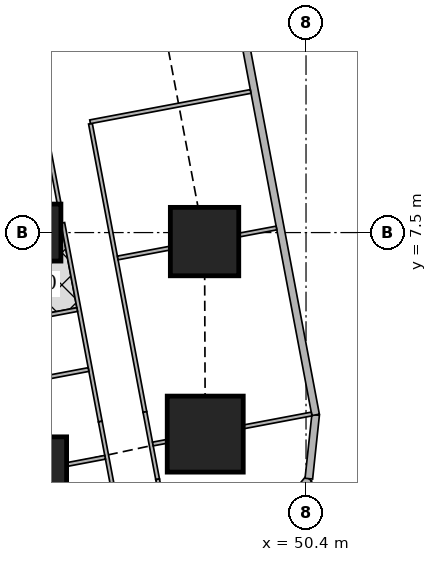
"""IFC4 building model, lengths in metres.
Left out: names, types, materials, properties, quantities, classifications, styles, units other than length and angle.
Written with IfcOpenShell. Run it as: python <this file> out.ifc"""

import sys

from ifc_helpers import new_model, si_unit, direction, frame, frame_2d, origin, origin_2d, place, context, subcontext, project, spatial, rectangle, extrude, element, fill, save


model = new_model("IFC4")
c1 = context("Model", 3, precision=1e-05, world=origin(), true_north=direction((0.0, 1.0)))
c2 = subcontext(c1, "Body", "Model", "MODEL_VIEW")
j1 = project(units=[si_unit("LENGTHUNIT", "METRE"), si_unit("PLANEANGLEUNIT", "RADIAN")], contexts=[c1])
p1 = place(None, origin())
s1 = spatial("IfcSite", under=j1, at=p1, CompositionType="ELEMENT")
p2 = place(p1, origin())
s2 = spatial("IfcBuilding", under=s1, at=p2, CompositionType="ELEMENT")
p3 = place(p2, frame((0.0, 0.0, 169.55)))
s3 = spatial("IfcBuildingStorey", under=s2, at=p3, CompositionType="ELEMENT", Elevation=169.55)
p4 = place(p3, frame((43.2, 1.225, 0.0), z_axis=(0.0, 0.0, 1.0), x_axis=(1.0, 0.0, 0.0)))
e1 = element("IfcColumn", 1, at=p4, inside=s3, PredefinedType="COLUMN", context=c2, shape_type="SweptSolid", body=[
    extrude(rectangle(XDim=1.8, YDim=1.8, at=origin_2d()), origin(), (0.0, 0.0, 1.0), 3.75),
])
p5 = place(p3, frame((47.748, 2.197, 0.0), z_axis=(0.0, 0.0, 1.0), x_axis=(1.0, 0.0, 0.0)))
e2 = element("IfcColumn", 2, at=p5, inside=s3, PredefinedType="COLUMN", context=c2, shape_type="SweptSolid", body=[
    extrude(rectangle(XDim=2.0, YDim=2.0, at=origin_2d()), origin(), (0.0, 0.0, 1.0), 3.75),
])
p6 = place(p3, frame((43.2, 7.5, 0.0), z_axis=(0.0, 0.0, 1.0), x_axis=(1.0, 0.0, 0.0)))
e3 = element("IfcColumn", 3, at=p6, inside=s3, PredefinedType="COLUMN", context=c2, shape_type="SweptSolid", body=[
    extrude(rectangle(XDim=1.5, YDim=1.5, at=origin_2d()), origin(), (0.0, 0.0, 1.0), 3.75),
])
p7 = place(p3, frame((47.73, 7.263, 0.0), z_axis=(0.0, 0.0, 1.0), x_axis=(1.0, 0.0, 0.0)))
e4 = element("IfcColumn", 4, at=p7, inside=s3, PredefinedType="COLUMN", context=c2, shape_type="SweptSolid", body=[
    extrude(rectangle(XDim=1.8, YDim=1.8, at=origin_2d()), origin(), (0.0, 0.0, 1.0), 3.75),
])
p8 = place(p3, frame((49.407, -0.263, 0.0), z_axis=(0.0, 0.0, 1.0), x_axis=(0.638042593423, 0.770001070764, 0.0)))
e5 = element("IfcWall", 5, at=p8, inside=s3, PredefinedType="SOLIDWALL", context=c2, shape_type="SweptSolid", body=[
    extrude(rectangle(XDim=1.673, YDim=0.2, at=frame_2d((0.836, 0.0))), origin(), (0.0, 0.0, 1.0), 3.5),
])
p9 = place(p3, frame((50.474, 1.025, 0.0), z_axis=(0.0, 0.0, 1.0), x_axis=(0.106047815515, 0.994361031429, 0.0)))
e6 = element("IfcWall", 6, at=p9, inside=s3, PredefinedType="SOLIDWALL", context=c2, shape_type="SweptSolid", body=[
    extrude(rectangle(XDim=1.688, YDim=0.2, at=frame_2d((0.844, 0.0))), origin(), (0.0, 0.0, 1.0), 3.5),
])
p10 = place(p3, frame((50.653, 2.703, 0.0), z_axis=(0.0, 0.0, 1.0), x_axis=(-0.185612026696, 0.982623109613, 0.0)))
e7 = element("IfcWall", 7, at=p10, inside=s3, PredefinedType="SOLIDWALL", context=c2, shape_type="SweptSolid", body=[
    extrude(rectangle(XDim=41.393, YDim=0.2, at=frame_2d((20.697, 0.0))), origin(), (0.0, 0.0, 1.0), 3.5),
])
p11 = place(p10, frame((1.633, 0.0, 0.9)))
e8 = element("IfcOpeningElement", 8, at=p11, cuts=e7, PredefinedType="OPENING", context=c2, shape_type="SweptSolid", body=[
    extrude(rectangle(XDim=1.8, YDim=1.5, at=frame_2d((0.9, 0.75))), frame((0.0, 0.11, 0.0), z_axis=(0.0, -1.0, 0.0), x_axis=(1.0, 0.0, 0.0)), (0.0, 0.0, 1.0), 0.22),
])
p12 = place(p10, frame((6.032, 0.0, 0.9)))
e9 = element("IfcOpeningElement", 9, at=p12, cuts=e7, PredefinedType="OPENING", context=c2, shape_type="SweptSolid", body=[
    extrude(rectangle(XDim=1.8, YDim=1.5, at=frame_2d((0.9, 0.75))), frame((0.0, 0.11, 0.0), z_axis=(0.0, -1.0, 0.0), x_axis=(1.0, 0.0, 0.0)), (0.0, 0.0, 1.0), 0.22),
])
p13 = place(p10, frame((9.848, 0.0, 0.9)))
e10 = element("IfcOpeningElement", 10, at=p13, cuts=e7, PredefinedType="OPENING", context=c2, shape_type="SweptSolid", body=[
    extrude(rectangle(XDim=1.8, YDim=1.5, at=frame_2d((0.9, 0.75))), frame((0.0, 0.11, 0.0), z_axis=(0.0, -1.0, 0.0), x_axis=(1.0, 0.0, 0.0)), (0.0, 0.0, 1.0), 0.22),
])
p14 = place(p10, frame((13.664, 0.0, 0.9)))
e11 = element("IfcOpeningElement", 11, at=p14, cuts=e7, PredefinedType="OPENING", context=c2, shape_type="SweptSolid", body=[
    extrude(rectangle(XDim=1.8, YDim=1.5, at=frame_2d((0.9, 0.75))), frame((0.0, 0.11, 0.0), z_axis=(0.0, -1.0, 0.0), x_axis=(1.0, 0.0, 0.0)), (0.0, 0.0, 1.0), 0.22),
])
p15 = place(p10, frame((17.481, 0.0, 0.9)))
e12 = element("IfcOpeningElement", 12, at=p15, cuts=e7, PredefinedType="OPENING", context=c2, shape_type="SweptSolid", body=[
    extrude(rectangle(XDim=1.8, YDim=1.5, at=frame_2d((0.9, 0.75))), frame((0.0, 0.11, 0.0), z_axis=(0.0, -1.0, 0.0), x_axis=(1.0, 0.0, 0.0)), (0.0, 0.0, 1.0), 0.22),
])
p16 = place(p10, frame((21.297, 0.0, 0.9)))
e13 = element("IfcOpeningElement", 13, at=p16, cuts=e7, PredefinedType="OPENING", context=c2, shape_type="SweptSolid", body=[
    extrude(rectangle(XDim=1.8, YDim=1.5, at=frame_2d((0.9, 0.75))), frame((0.0, 0.11, 0.0), z_axis=(0.0, -1.0, 0.0), x_axis=(1.0, 0.0, 0.0)), (0.0, 0.0, 1.0), 0.22),
])
p17 = place(p10, frame((25.113, 0.0, 0.9)))
e14 = element("IfcOpeningElement", 14, at=p17, cuts=e7, PredefinedType="OPENING", context=c2, shape_type="SweptSolid", body=[
    extrude(rectangle(XDim=1.8, YDim=1.5, at=frame_2d((0.9, 0.75))), frame((0.0, 0.11, 0.0), z_axis=(0.0, -1.0, 0.0), x_axis=(1.0, 0.0, 0.0)), (0.0, 0.0, 1.0), 0.22),
])
p18 = place(p10, frame((28.93, 0.0, 0.9)))
e15 = element("IfcOpeningElement", 15, at=p18, cuts=e7, PredefinedType="OPENING", context=c2, shape_type="SweptSolid", body=[
    extrude(rectangle(XDim=1.8, YDim=1.5, at=frame_2d((0.9, 0.75))), frame((0.0, 0.11, 0.0), z_axis=(0.0, -1.0, 0.0), x_axis=(1.0, 0.0, 0.0)), (0.0, 0.0, 1.0), 0.22),
])
p19 = place(p10, frame((32.746, 0.0, 0.9)))
e16 = element("IfcOpeningElement", 16, at=p19, cuts=e7, PredefinedType="OPENING", context=c2, shape_type="SweptSolid", body=[
    extrude(rectangle(XDim=1.8, YDim=1.5, at=frame_2d((0.9, 0.75))), frame((0.0, 0.11, 0.0), z_axis=(0.0, -1.0, 0.0), x_axis=(1.0, 0.0, 0.0)), (0.0, 0.0, 1.0), 0.22),
])
p20 = place(p10, frame((36.481, 0.0, 0.9)))
e17 = element("IfcOpeningElement", 17, at=p20, cuts=e7, PredefinedType="OPENING", context=c2, shape_type="SweptSolid", body=[
    extrude(rectangle(XDim=1.8, YDim=1.5, at=frame_2d((0.9, 0.75))), frame((0.0, 0.11, 0.0), z_axis=(0.0, -1.0, 0.0), x_axis=(1.0, 0.0, 0.0)), (0.0, 0.0, 1.0), 0.22),
])
p21 = place(p3, frame((44.727, 10.366, 0.0), z_axis=(0.0, 0.0, 1.0), x_axis=(0.185578957652, -0.982629355595, 0.0)))
e18 = element("IfcWall", 18, at=p21, inside=s3, PredefinedType="PARTITIONING", context=c2, shape_type="SweptSolid", body=[
    extrude(rectangle(XDim=7.721, YDim=0.1, at=frame_2d((3.86, 0.0))), origin(), (0.0, 0.0, 1.0), 3.5),
])
p22 = place(p21, frame((0.151, 0.0, 0.0)))
e19 = element("IfcOpeningElement", 19, at=p22, cuts=e18, PredefinedType="OPENING", context=c2, shape_type="SweptSolid", body=[
    extrude(rectangle(XDim=0.9, YDim=2.1, at=frame_2d((0.45, 1.05))), frame((0.0, 0.06, 0.0), z_axis=(0.0, -1.0, 0.0), x_axis=(1.0, 0.0, 0.0)), (0.0, 0.0, 1.0), 0.12),
])
p23 = place(p21, frame((3.806, 0.0, 0.0)))
e20 = element("IfcOpeningElement", 20, at=p23, cuts=e18, PredefinedType="OPENING", context=c2, shape_type="SweptSolid", body=[
    extrude(rectangle(XDim=0.9, YDim=2.1, at=frame_2d((0.45, 1.05))), frame((0.0, 0.06, 0.0), z_axis=(0.0, -1.0, 0.0), x_axis=(1.0, 0.0, 0.0)), (0.0, 0.0, 1.0), 0.12),
])
p24 = place(p3, frame((46.16, 2.779, 0.0), z_axis=(0.0, 0.0, 1.0), x_axis=(0.18597295662, -0.982554863306, 0.0)))
e21 = element("IfcWall", 21, at=p24, inside=s3, PredefinedType="PARTITIONING", context=c2, shape_type="SweptSolid", body=[
    extrude(rectangle(XDim=1.802, YDim=0.1, at=frame_2d((0.901, 0.0))), origin(), (0.0, 0.0, 1.0), 2.1),
])
p25 = place(p3, frame((46.495, 1.008, 0.0), z_axis=(0.0, 0.0, 1.0), x_axis=(0.185535059532, -0.982637645159, 0.0)))
e22 = element("IfcWall", 22, at=p25, inside=s3, PredefinedType="PARTITIONING", context=c2, shape_type="SweptSolid", body=[
    extrude(rectangle(XDim=1.644, YDim=0.1, at=frame_2d((0.822, 0.0))), origin(), (0.0, 0.0, 1.0), 3.5),
])
p26 = place(p3, frame((43.539, 10.192, 0.0), z_axis=(0.0, 0.0, 1.0), x_axis=(0.18564540894, -0.982616803306, 0.0)))
e23 = element("IfcWall", 23, at=p26, inside=s3, PredefinedType="PARTITIONING", context=c2, shape_type="SweptSolid", body=[
    extrude(rectangle(XDim=1.966, YDim=0.1, at=frame_2d((0.983, 0.0))), origin(), (0.0, 0.0, 1.0), 3.5),
])
p27 = place(p3, frame((43.999, 7.755, 0.0), z_axis=(0.0, 0.0, 1.0), x_axis=(0.185565904578, -0.982631820703, 0.0)))
e24 = element("IfcWall", 24, at=p27, inside=s3, PredefinedType="PARTITIONING", context=c2, shape_type="SweptSolid", body=[
    extrude(rectangle(XDim=5.319, YDim=0.1, at=frame_2d((2.66, 0.0))), origin(), (0.0, 0.0, 1.0), 3.5),
])
p28 = place(p27, frame((1.0, 0.0, 0.0)))
e25 = element("IfcOpeningElement", 25, at=p28, cuts=e24, PredefinedType="OPENING", context=c2, shape_type="SweptSolid", body=[
    extrude(rectangle(XDim=0.9, YDim=2.1, at=frame_2d((0.45, 1.05))), frame((0.0, 0.06, 0.0), z_axis=(0.0, -1.0, 0.0), x_axis=(1.0, 0.0, 0.0)), (0.0, 0.0, 1.0), 0.12),
])
p29 = place(p27, frame((4.269, 0.0, 0.0)))
e26 = element("IfcOpeningElement", 26, at=p29, cuts=e24, PredefinedType="OPENING", context=c2, shape_type="SweptSolid", body=[
    extrude(rectangle(XDim=0.9, YDim=2.1, at=frame_2d((0.45, 1.05))), frame((0.0, 0.06, 0.0), z_axis=(0.0, -1.0, 0.0), x_axis=(1.0, 0.0, 0.0)), (0.0, 0.0, 1.0), 0.12),
])
p30 = place(p27, frame((2.665, 0.0, 0.0)))
e27 = element("IfcOpeningElement", 27, at=p30, cuts=e24, PredefinedType="OPENING", context=c2, shape_type="SweptSolid", body=[
    extrude(rectangle(XDim=0.9, YDim=2.1, at=frame_2d((0.45, 1.05))), frame((0.0, 0.06, 0.0), z_axis=(0.0, -1.0, 0.0), x_axis=(1.0, 0.0, 0.0)), (0.0, 0.0, 1.0), 0.12),
])
p31 = place(p3, frame((44.986, 2.528, 0.0), z_axis=(0.0, 0.0, 1.0), x_axis=(0.18584218627, -0.982579605835, 0.0)))
e28 = element("IfcWall", 28, at=p31, inside=s3, PredefinedType="PARTITIONING", context=c2, shape_type="SweptSolid", body=[
    extrude(rectangle(XDim=1.802, YDim=0.1, at=frame_2d((0.901, 0.0))), origin(), (0.0, 0.0, 1.0), 2.1),
])
p32 = place(p3, frame((48.943, 11.213, 0.0), z_axis=(0.0, 0.0, 1.0), x_axis=(-0.982633535512, -0.185556823879, 0.0)))
e29 = element("IfcWall", 29, at=p32, inside=s3, PredefinedType="PARTITIONING", context=c2, shape_type="SweptSolid", body=[
    extrude(rectangle(XDim=4.3, YDim=0.1, at=frame_2d((2.15, 0.0))), origin(), (0.0, 0.0, 1.0), 2.1),
])
p33 = place(p3, frame((49.622, 7.62, 0.0), z_axis=(0.0, 0.0, 1.0), x_axis=(-0.982708646087, -0.185158626332, 0.0)))
e30 = element("IfcWall", 30, at=p33, inside=s3, PredefinedType="PARTITIONING", context=c2, shape_type="SweptSolid", body=[
    extrude(rectangle(XDim=1.0, YDim=0.1, at=frame_2d((0.5, 0.0))), origin(), (0.0, 0.0, 1.0), 3.5),
])
p34 = place(p3, frame((46.82, 7.091, 0.0), z_axis=(0.0, 0.0, 1.0), x_axis=(-0.982689853246, -0.185258339427, 0.0)))
e31 = element("IfcWall", 31, at=p34, inside=s3, PredefinedType="PARTITIONING", context=c2, shape_type="SweptSolid", body=[
    extrude(rectangle(XDim=1.398, YDim=0.1, at=frame_2d((0.699, 0.0))), origin(), (0.0, 0.0, 1.0), 3.5),
])
p35 = place(p3, frame((50.547, 2.726, 0.0), z_axis=(0.0, 0.0, 1.0), x_axis=(-0.982603988143, -0.185713226471, 0.0)))
e32 = element("IfcWall", 32, at=p35, inside=s3, PredefinedType="PARTITIONING", context=c2, shape_type="SweptSolid", body=[
    extrude(rectangle(XDim=1.821, YDim=0.1, at=frame_2d((0.91, 0.0))), origin(), (0.0, 0.0, 1.0), 3.5),
])
p36 = place(p3, frame((46.738, 2.006, 0.0), z_axis=(0.0, 0.0, 1.0), x_axis=(-0.982820466874, -0.184564161994, 0.0)))
e33 = element("IfcWall", 33, at=p36, inside=s3, PredefinedType="PARTITIONING", context=c2, shape_type="SweptSolid", body=[
    extrude(rectangle(XDim=0.374, YDim=0.1, at=frame_2d((0.187, 0.0))), origin(), (0.0, 0.0, 1.0), 2.1),
])
p37 = place(p3, frame((45.114, 1.587, 0.0), z_axis=(0.0, 0.0, 1.0), x_axis=(-0.982567886437, -0.185904138047, 0.0)))
e34 = element("IfcWall", 34, at=p37, inside=s3, PredefinedType="PARTITIONING", context=c2, shape_type="SweptSolid", body=[
    extrude(rectangle(XDim=1.022, YDim=0.1, at=frame_2d((0.511, 0.0))), origin(), (0.0, 0.0, 1.0), 2.1),
])
p38 = place(p3, frame((44.677, 3.896, 0.0), z_axis=(0.0, 0.0, 1.0), x_axis=(-0.982610347627, -0.185679575441, 0.0)))
e35 = element("IfcWall", 35, at=p38, inside=s3, PredefinedType="PARTITIONING", context=c2, shape_type="SweptSolid", body=[
    extrude(rectangle(XDim=3.274, YDim=0.1, at=frame_2d((1.637, 0.0))), origin(), (0.0, 0.0, 1.0), 3.5),
])
p39 = place(p3, frame((44.379, 5.474, 0.0), z_axis=(0.0, 0.0, 1.0), x_axis=(-0.982607026909, -0.185697147715, 0.0)))
e36 = element("IfcWall", 36, at=p39, inside=s3, PredefinedType="PARTITIONING", context=c2, shape_type="SweptSolid", body=[
    extrude(rectangle(XDim=3.275, YDim=0.1, at=frame_2d((1.637, 0.0))), origin(), (0.0, 0.0, 1.0), 3.5),
])
p40 = place(p3, frame((44.246, 12.916, 0.0), z_axis=(0.0, 0.0, 1.0), x_axis=(-0.982612837616, -0.185666398014, 0.0)))
e37 = element("IfcWall", 37, at=p40, inside=s3, PredefinedType="SOLIDWALL", context=c2, shape_type="SweptSolid", body=[
    extrude(rectangle(XDim=4.525, YDim=0.25, at=frame_2d((2.262, 0.0))), origin(), (0.0, 0.0, 1.0), 3.5),
])
p41 = place(p11, origin())
e38 = element("IfcWindow", 38, at=p41, inside=s3, PartitioningType="SINGLE_PANEL", PredefinedType="WINDOW", context=c2, shape_type="SweptSolid", body=[
    extrude(rectangle(XDim=1.8, YDim=1.5, at=frame_2d((0.9, 0.75))), frame((0.0, 0.03, 0.0), z_axis=(0.0, -1.0, 0.0), x_axis=(1.0, 0.0, 0.0)), (0.0, 0.0, 1.0), 0.06),
])
fill(e8, e38)
p42 = place(p12, origin())
e39 = element("IfcWindow", 39, at=p42, inside=s3, PartitioningType="SINGLE_PANEL", PredefinedType="WINDOW", context=c2, shape_type="SweptSolid", body=[
    extrude(rectangle(XDim=1.8, YDim=1.5, at=frame_2d((0.9, 0.75))), frame((0.0, 0.03, 0.0), z_axis=(0.0, -1.0, 0.0), x_axis=(1.0, 0.0, 0.0)), (0.0, 0.0, 1.0), 0.06),
])
fill(e9, e39)
p43 = place(p22, origin())
e40 = element("IfcDoor", 40, at=p43, inside=s3, OperationType="SINGLE_SWING_LEFT", PredefinedType="DOOR", context=c2, shape_type="SweptSolid", body=[
    extrude(rectangle(XDim=0.9, YDim=2.1, at=frame_2d((0.45, 1.05))), frame((0.0, 0.025, 0.0), z_axis=(0.0, -1.0, 0.0), x_axis=(1.0, 0.0, 0.0)), (0.0, 0.0, 1.0), 0.05),
])
fill(e19, e40)
p44 = place(p23, origin())
e41 = element("IfcDoor", 41, at=p44, inside=s3, OperationType="SINGLE_SWING_LEFT", PredefinedType="DOOR", context=c2, shape_type="SweptSolid", body=[
    extrude(rectangle(XDim=0.9, YDim=2.1, at=frame_2d((0.45, 1.05))), frame((0.0, 0.025, 0.0), z_axis=(0.0, -1.0, 0.0), x_axis=(1.0, 0.0, 0.0)), (0.0, 0.0, 1.0), 0.05),
])
fill(e20, e41)
p45 = place(p28, origin())
e42 = element("IfcDoor", 42, at=p45, inside=s3, OperationType="SINGLE_SWING_LEFT", PredefinedType="DOOR", context=c2, shape_type="SweptSolid", body=[
    extrude(rectangle(XDim=0.9, YDim=2.1, at=frame_2d((0.45, 1.05))), frame((0.0, 0.025, 0.0), z_axis=(0.0, -1.0, 0.0), x_axis=(1.0, 0.0, 0.0)), (0.0, 0.0, 1.0), 0.05),
])
fill(e25, e42)
p46 = place(p29, origin())
e43 = element("IfcDoor", 43, at=p46, inside=s3, OperationType="SINGLE_SWING_LEFT", PredefinedType="DOOR", context=c2, shape_type="SweptSolid", body=[
    extrude(rectangle(XDim=0.9, YDim=2.1, at=frame_2d((0.45, 1.05))), frame((0.0, 0.025, 0.0), z_axis=(0.0, -1.0, 0.0), x_axis=(1.0, 0.0, 0.0)), (0.0, 0.0, 1.0), 0.05),
])
fill(e26, e43)
p47 = place(p30, origin())
e44 = element("IfcDoor", 44, at=p47, inside=s3, OperationType="SINGLE_SWING_LEFT", PredefinedType="DOOR", context=c2, shape_type="SweptSolid", body=[
    extrude(rectangle(XDim=0.9, YDim=2.1, at=frame_2d((0.45, 1.05))), frame((0.0, 0.025, 0.0), z_axis=(0.0, -1.0, 0.0), x_axis=(1.0, 0.0, 0.0)), (0.0, 0.0, 1.0), 0.05),
])
fill(e27, e44)
save(model, sys.argv[1])
